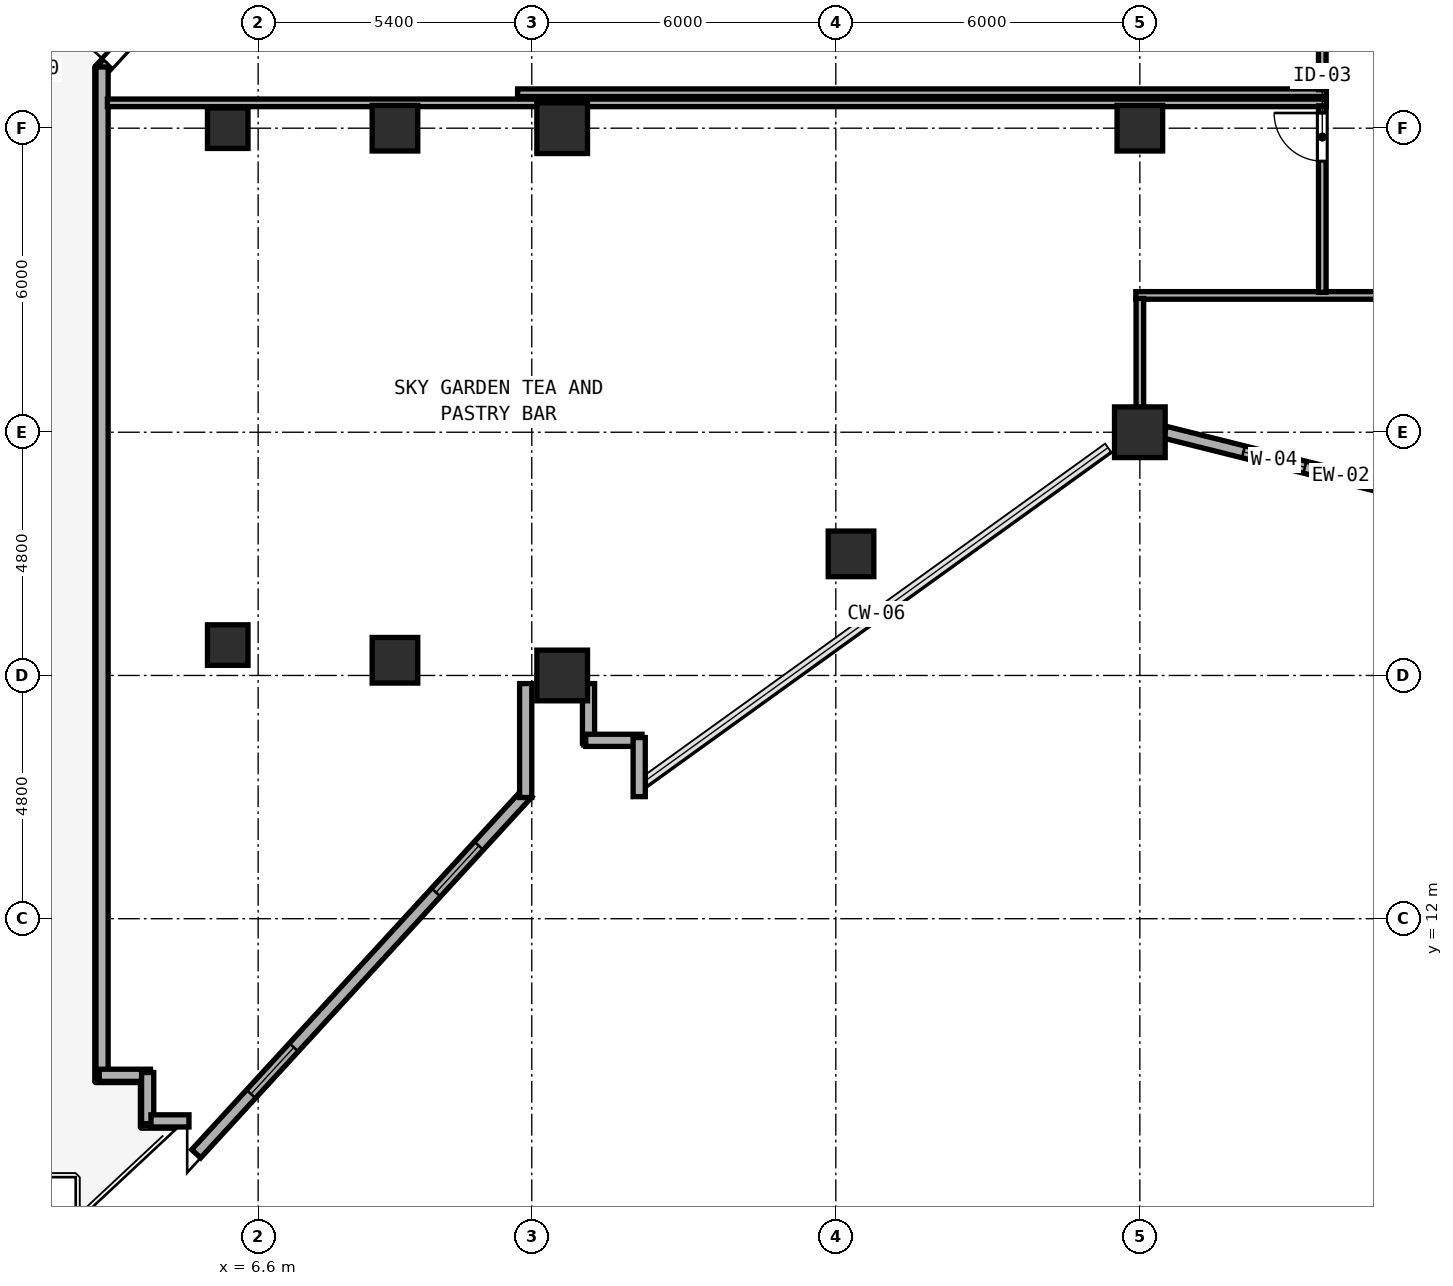
"""IFC4 building model, lengths in metres.
Left out: names, types, materials, properties, quantities, classifications, styles, units other than length and angle.
Written with IfcOpenShell. Run it as: python <this file> out.ifc"""

import sys

from ifc_helpers import new_model, si_unit, direction, frame, frame_2d, origin, origin_2d, place, context, subcontext, project, spatial, rectangle, hollow_rectangle, extrude, element, fill, save


model = new_model("IFC4")
c1 = context("Model", 3, precision=1e-05, world=origin(), true_north=direction((0.0, 1.0)))
c2 = subcontext(c1, "Body", "Model", "MODEL_VIEW")
j1 = project(units=[si_unit("LENGTHUNIT", "METRE"), si_unit("PLANEANGLEUNIT", "RADIAN")], contexts=[c1])
p1 = place(None, origin())
s1 = spatial("IfcSite", under=j1, at=p1, CompositionType="ELEMENT")
p2 = place(p1, origin())
s2 = spatial("IfcBuilding", under=s1, at=p2, CompositionType="ELEMENT")
p3 = place(p2, frame((0.0, 0.0, 94.0)))
s3 = spatial("IfcBuildingStorey", under=s2, at=p3, CompositionType="ELEMENT", Elevation=94.0)
for number, where, z_axis, x_axis in (
    (1, (24.0, 21.6, 0.0), (0.0, 0.0, 1.0), (1.0, 0.0, 0.0)),
    (2, (12.6, 16.8, 0.0), (0.0, 0.0, 1.0), (1.0, 0.0, 0.0)),
    (3, (12.6, 27.6, 0.0), (0.0, 0.0, 1.0), (1.0, 0.0, 0.0)),
):
    element("IfcColumn", number, at=place(p3, frame(where, z_axis=z_axis, x_axis=x_axis)), inside=s3, PredefinedType="COLUMN", context=c2, shape_type="SweptSolid", body=[
        extrude(hollow_rectangle(XDim=1.0, YDim=1.0, WallThickness=0.038, at=origin_2d()), origin(), (0.0, 0.0, 1.0), 4.4),
    ])
for number, where, z_axis, x_axis in (
    (4, (6.0, 17.4, 0.0), (0.0, 0.0, 1.0), (1.0, 0.0, 0.0)),
    (5, (6.0, 27.6, 0.0), (0.0, 0.0, 1.0), (1.0, 0.0, 0.0)),
):
    element("IfcColumn", number, at=place(p3, frame(where, z_axis=z_axis, x_axis=x_axis)), inside=s3, PredefinedType="COLUMN", context=c2, shape_type="SweptSolid", body=[
        extrude(hollow_rectangle(XDim=0.8, YDim=0.8, WallThickness=0.03, at=origin_2d()), origin(), (0.0, 0.0, 1.0), 4.4),
    ])
for number, where, z_axis, x_axis in (
    (6, (24.0, 27.6, 0.0), (0.0, 0.0, 1.0), (1.0, 0.0, 0.0)),
    (7, (18.3, 19.2, 0.0), (0.0, 0.0, 1.0), (1.0, 0.0, 0.0)),
    (8, (9.3, 17.1, 0.0), (0.0, 0.0, 1.0), (1.0, 0.0, 0.0)),
    (9, (9.3, 27.6, 0.0), (0.0, 0.0, 1.0), (1.0, 0.0, 0.0)),
):
    element("IfcColumn", number, at=place(p3, frame(where, z_axis=z_axis, x_axis=x_axis)), inside=s3, PredefinedType="COLUMN", context=c2, shape_type="SweptSolid", body=[
        extrude(hollow_rectangle(XDim=0.9, YDim=0.9, WallThickness=0.034, at=origin_2d()), origin(), (0.0, 0.0, 1.0), 4.4),
    ])
p4 = place(p3, frame((13.12, 16.64, 0.0), z_axis=(0.0, 0.0, 1.0), x_axis=(0.0, -1.0, 0.0)))
e10 = element("IfcWall", 10, at=p4, inside=s3, PredefinedType="SOLIDWALL", context=c2, shape_type="SweptSolid", body=[
    extrude(rectangle(XDim=1.175, YDim=0.24, at=frame_2d((0.587, 0.0))), origin(), (0.0, 0.0, 1.0), 4.2),
])
p5 = place(p3, frame((13.065, 15.52, 0.0), z_axis=(0.0, 0.0, 1.0), x_axis=(1.0, 0.0, 0.0)))
e11 = element("IfcWall", 11, at=p5, inside=s3, PredefinedType="SOLIDWALL", context=c2, shape_type="SweptSolid", body=[
    extrude(rectangle(XDim=1.11, YDim=0.24, at=frame_2d((0.555, 0.0))), origin(), (0.0, 0.0, 1.0), 4.2),
])
p6 = place(p3, frame((14.12, 15.575, 0.0), z_axis=(0.0, 0.0, 1.0), x_axis=(0.0, -1.0, 0.0)))
e12 = element("IfcWall", 12, at=p6, inside=s3, PredefinedType="SOLIDWALL", context=c2, shape_type="SweptSolid", body=[
    extrude(rectangle(XDim=1.166, YDim=0.24, at=frame_2d((0.583, 0.0))), origin(), (0.0, 0.0, 1.0), 4.2),
])
p7 = place(p3, frame((24.492, 21.601, 0.0), z_axis=(0.0, 0.0, 1.0), x_axis=(0.970145568042, -0.242523353121, 0.0)))
e13 = element("IfcWall", 13, at=p7, inside=s3, PredefinedType="SOLIDWALL", context=c2, shape_type="SweptSolid", body=[
    extrude(rectangle(XDim=4.681, YDim=0.24, at=frame_2d((2.34, 0.0))), origin(), (0.0, 0.0, 1.0), 3.745),
])
p8 = place(p7, frame((1.6, 0.0, 0.85)))
e14 = element("IfcOpeningElement", 14, at=p8, cuts=e13, PredefinedType="OPENING", context=c2, shape_type="SweptSolid", body=[
    extrude(rectangle(XDim=1.25, YDim=1.95, at=frame_2d((0.625, 0.975))), frame((0.0, 0.13, 0.0), z_axis=(0.0, -1.0, 0.0), x_axis=(1.0, 0.0, 0.0)), (0.0, 0.0, 1.0), 0.26),
])
p9 = place(p3, frame((5.706, 31.138, 0.0), z_axis=(0.0, 0.0, 1.0), x_axis=(-0.675758228752, -0.737123338577, 0.0)))
e15 = element("IfcWall", 15, at=p9, inside=s3, PredefinedType="SOLIDWALL", context=c2, shape_type="SweptSolid", body=[
    extrude(rectangle(XDim=3.29, YDim=0.24, at=frame_2d((1.645, 0.0))), origin(), (0.0, 0.0, 1.0), 4.2),
])
p10 = place(p9, frame((3.07, 0.0, 0.0), z_axis=(0.0, 0.0, 1.0), x_axis=(-1.0, 0.0, 0.0)))
e16 = element("IfcOpeningElement", 16, at=p10, cuts=e15, PredefinedType="OPENING", context=c2, shape_type="SweptSolid", body=[
    extrude(rectangle(XDim=1.5, YDim=2.2, at=frame_2d((0.75, 1.1))), frame((0.0, 0.13, 0.0), z_axis=(0.0, -1.0, 0.0), x_axis=(1.0, 0.0, 0.0)), (0.0, 0.0, 1.0), 0.26),
])
p11 = place(p3, frame((3.52, 28.808, 0.0), z_axis=(0.0, 0.0, 1.0), x_axis=(0.0, -1.0, 0.0)))
e17 = element("IfcWall", 17, at=p11, inside=s3, PredefinedType="SOLIDWALL", context=c2, shape_type="SweptSolid", body=[
    extrude(rectangle(XDim=19.953, YDim=0.24, at=frame_2d((9.977, 0.0))), origin(), (0.0, 0.0, 1.0), 4.2),
])
for number, where, z_axis, x_axis in (
    (18, (3.465, 8.91, 0.0), (0.0, 0.0, 1.0), (1.0, 0.0, 0.0)),
    (19, (4.42, 8.965, 0.0), (0.0, 0.0, 1.0), (0.0, -1.0, 0.0)),
):
    element("IfcWall", number, at=place(p3, frame(where, z_axis=z_axis, x_axis=x_axis)), inside=s3, PredefinedType="SOLIDWALL", context=c2, shape_type="SweptSolid", body=[
        extrude(rectangle(XDim=1.01, YDim=0.24, at=frame_2d((0.505, 0.0))), origin(), (0.0, 0.0, 1.0), 4.2),
    ])
p12 = place(p3, frame((4.485, 8.01, 0.0), z_axis=(0.0, 0.0, 1.0), x_axis=(1.0, 0.0, 0.0)))
e20 = element("IfcWall", 20, at=p12, inside=s3, PredefinedType="SOLIDWALL", context=c2, shape_type="SweptSolid", body=[
    extrude(rectangle(XDim=0.75, YDim=0.24, at=frame_2d((0.375, 0.0))), origin(), (0.0, 0.0, 1.0), 4.2),
])
p13 = place(p3, frame((5.377, 7.361, 0.0), z_axis=(0.0, 0.0, 1.0), x_axis=(0.676129143807, 0.736783130165, 0.0)))
e21 = element("IfcWall", 21, at=p13, inside=s3, PredefinedType="SOLIDWALL", context=c2, shape_type="SweptSolid", body=[
    extrude(rectangle(XDim=9.672, YDim=0.24, at=frame_2d((4.836, 0.0))), origin(), (0.0, 0.0, 1.0), 4.2),
])
p14 = place(p13, frame((1.6, 0.0, 0.85)))
e22 = element("IfcOpeningElement", 22, at=p14, cuts=e21, PredefinedType="OPENING", context=c2, shape_type="SweptSolid", body=[
    extrude(rectangle(XDim=1.25, YDim=1.95, at=frame_2d((0.625, 0.975))), frame((0.0, 0.13, 0.0), z_axis=(0.0, -1.0, 0.0), x_axis=(1.0, 0.0, 0.0)), (0.0, 0.0, 1.0), 0.26),
])
p15 = place(p13, frame((7.0, 0.0, 0.85)))
e23 = element("IfcOpeningElement", 23, at=p15, cuts=e21, PredefinedType="OPENING", context=c2, shape_type="SweptSolid", body=[
    extrude(rectangle(XDim=1.25, YDim=1.95, at=frame_2d((0.625, 0.975))), frame((0.0, 0.13, 0.0), z_axis=(0.0, -1.0, 0.0), x_axis=(1.0, 0.0, 0.0)), (0.0, 0.0, 1.0), 0.26),
])
p16 = place(p3, frame((11.88, 14.392, 0.0), z_axis=(0.0, 0.0, 1.0), x_axis=(0.0, 1.0, 0.0)))
e24 = element("IfcWall", 24, at=p16, inside=s3, PredefinedType="SOLIDWALL", context=c2, shape_type="SweptSolid", body=[
    extrude(rectangle(XDim=2.248, YDim=0.24, at=frame_2d((1.124, 0.0))), origin(), (0.0, 0.0, 1.0), 4.2),
])
p17 = place(p3, frame((23.92, 24.3, 0.0), z_axis=(0.0, 0.0, 1.0), x_axis=(1.0, 0.0, 0.0)))
e25 = element("IfcWall", 25, at=p17, inside=s3, PredefinedType="PARTITIONING", context=c2, shape_type="SweptSolid", body=[
    extrude(rectangle(XDim=28.96, YDim=0.15, at=frame_2d((14.48, 0.0))), origin(), (0.0, 0.0, 1.0), 4.2),
])
p18 = place(p17, frame((7.9, 0.0, 0.0), z_axis=(0.0, 0.0, 1.0), x_axis=(-1.0, 0.0, 0.0)))
e26 = element("IfcOpeningElement", 26, at=p18, cuts=e25, PredefinedType="OPENING", context=c2, shape_type="SweptSolid", body=[
    extrude(rectangle(XDim=1.4, YDim=2.18, at=frame_2d((0.7, 1.09))), frame((0.0, 0.085, 0.0), z_axis=(0.0, -1.0, 0.0), x_axis=(1.0, 0.0, 0.0)), (0.0, 0.0, 1.0), 0.17),
])
p19 = place(p3, frame((24.0, 21.819, 0.0), z_axis=(0.0, 0.0, 1.0), x_axis=(0.0, 1.0, 0.0)))
e27 = element("IfcWall", 27, at=p19, inside=s3, PredefinedType="PARTITIONING", context=c2, shape_type="SweptSolid", body=[
    extrude(rectangle(XDim=2.421, YDim=0.15, at=frame_2d((1.211, 0.0))), origin(), (0.0, 0.0, 1.0), 3.745),
])
p20 = place(p3, frame((3.625, 28.1, 0.0), z_axis=(0.0, 0.0, 1.0), x_axis=(1.0, 0.0, 0.0)))
e28 = element("IfcWall", 28, at=p20, inside=s3, PredefinedType="PARTITIONING", context=c2, shape_type="SweptSolid", body=[
    extrude(rectangle(XDim=24.055, YDim=0.15, at=frame_2d((12.027, 0.0))), origin(), (0.0, 0.0, 1.0), 4.2),
])
p21 = place(p3, frame((27.6, 24.36, 0.0), z_axis=(0.0, 0.0, 1.0), x_axis=(0.0, 1.0, 0.0)))
e29 = element("IfcWall", 29, at=p21, inside=s3, PredefinedType="PARTITIONING", context=c2, shape_type="SweptSolid", body=[
    extrude(rectangle(XDim=3.68, YDim=0.15, at=frame_2d((1.84, 0.0))), origin(), (0.0, 0.0, 1.0), 4.2),
])
p22 = place(p21, frame((3.54, 0.0, 0.0), z_axis=(0.0, 0.0, 1.0), x_axis=(-1.0, 0.0, 0.0)))
e30 = element("IfcOpeningElement", 30, at=p22, cuts=e29, PredefinedType="OPENING", context=c2, shape_type="SweptSolid", body=[
    extrude(rectangle(XDim=0.95, YDim=2.12, at=frame_2d((0.475, 1.06))), frame((0.0, 0.085, 0.0), z_axis=(0.0, -1.0, 0.0), x_axis=(1.0, 0.0, 0.0)), (0.0, 0.0, 1.0), 0.17),
])
p23 = place(p3, frame((11.72, 28.3, 0.0), z_axis=(0.0, 0.0, 1.0), x_axis=(1.0, 0.0, 0.0)))
e31 = element("IfcWall", 31, at=p23, inside=s3, PredefinedType="PARTITIONING", context=c2, shape_type="SweptSolid", body=[
    extrude(rectangle(XDim=15.96, YDim=0.15, at=frame_2d((7.98, 0.0))), origin(), (0.0, 0.0, 1.0), 4.2),
])
p24 = place(p3, frame((27.6, 28.36, 0.0), z_axis=(0.0, 0.0, 1.0), x_axis=(0.0, 1.0, 0.0)))
e32 = element("IfcWall", 32, at=p24, inside=s3, PredefinedType="PARTITIONING", context=c2, shape_type="SweptSolid", body=[
    extrude(rectangle(XDim=16.72, YDim=0.15, at=frame_2d((8.36, 0.0))), origin(), (0.0, 0.0, 1.0), 4.2),
])
p25 = place(p24, frame((5.31, 0.0, 0.0), z_axis=(0.0, 0.0, 1.0), x_axis=(-1.0, 0.0, 0.0)))
e33 = element("IfcOpeningElement", 33, at=p25, cuts=e32, PredefinedType="OPENING", context=c2, shape_type="SweptSolid", body=[
    extrude(rectangle(XDim=0.95, YDim=2.12, at=frame_2d((0.475, 1.06))), frame((0.0, 0.085, 0.0), z_axis=(0.0, -1.0, 0.0), x_axis=(1.0, 0.0, 0.0)), (0.0, 0.0, 1.0), 0.17),
])
p26 = place(p8, origin())
e34 = element("IfcWindow", 34, at=p26, inside=s3, PartitioningType="SINGLE_PANEL", PredefinedType="WINDOW", context=c2, shape_type="SweptSolid", body=[
    extrude(rectangle(XDim=1.25, YDim=1.95, at=frame_2d((0.625, 0.975))), frame((0.0, 0.03, 0.0), z_axis=(0.0, -1.0, 0.0), x_axis=(1.0, 0.0, 0.0)), (0.0, 0.0, 1.0), 0.06),
])
fill(e14, e34)
p27 = place(p14, origin())
e35 = element("IfcWindow", 35, at=p27, inside=s3, PartitioningType="SINGLE_PANEL", PredefinedType="WINDOW", context=c2, shape_type="SweptSolid", body=[
    extrude(rectangle(XDim=1.25, YDim=1.95, at=frame_2d((0.625, 0.975))), frame((0.0, 0.03, 0.0), z_axis=(0.0, -1.0, 0.0), x_axis=(1.0, 0.0, 0.0)), (0.0, 0.0, 1.0), 0.06),
])
fill(e22, e35)
p28 = place(p15, origin())
e36 = element("IfcWindow", 36, at=p28, inside=s3, PartitioningType="SINGLE_PANEL", PredefinedType="WINDOW", context=c2, shape_type="SweptSolid", body=[
    extrude(rectangle(XDim=1.25, YDim=1.95, at=frame_2d((0.625, 0.975))), frame((0.0, 0.03, 0.0), z_axis=(0.0, -1.0, 0.0), x_axis=(1.0, 0.0, 0.0)), (0.0, 0.0, 1.0), 0.06),
])
fill(e23, e36)
p29 = place(p10, origin())
e37 = element("IfcDoor", 37, at=p29, inside=s3, OperationType="DOUBLE_DOOR_SINGLE_SWING", PredefinedType="DOOR", context=c2, shape_type="SweptSolid", body=[
    extrude(rectangle(XDim=1.5, YDim=2.2, at=frame_2d((0.75, 1.1))), frame((0.0, 0.025, 0.0), z_axis=(0.0, -1.0, 0.0), x_axis=(1.0, 0.0, 0.0)), (0.0, 0.0, 1.0), 0.05),
])
fill(e16, e37)
p30 = place(p22, origin())
e38 = element("IfcDoor", 38, at=p30, inside=s3, OperationType="SINGLE_SWING_LEFT", PredefinedType="DOOR", context=c2, shape_type="SweptSolid", body=[
    extrude(rectangle(XDim=0.95, YDim=2.12, at=frame_2d((0.475, 1.06))), frame((0.0, 0.025, 0.0), z_axis=(0.0, -1.0, 0.0), x_axis=(1.0, 0.0, 0.0)), (0.0, 0.0, 1.0), 0.05),
])
fill(e30, e38)
save(model, sys.argv[1])
